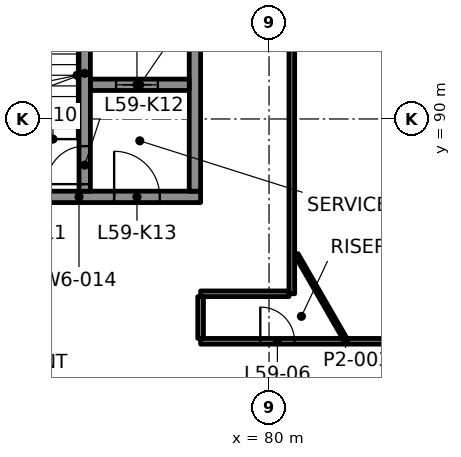
"""IFC4 building model, lengths in metres.
Left out: names, types, materials, properties, quantities, classifications, styles, units other than length and angle.
Written with IfcOpenShell. Run it as: python <this file> out.ifc"""

import sys

from ifc_helpers import new_model, si_unit, direction, frame, frame_2d, origin, place, context, subcontext, project, spatial, rectangle, extrude, element, fill, save


model = new_model("IFC4")
c1 = context("Model", 3, precision=1e-05, world=origin(), true_north=direction((0.0, 1.0)))
c2 = subcontext(c1, "Body", "Model", "MODEL_VIEW")
j1 = project(units=[si_unit("LENGTHUNIT", "METRE"), si_unit("PLANEANGLEUNIT", "RADIAN")], contexts=[c1])
p1 = place(None, origin())
s1 = spatial("IfcSite", under=j1, at=p1, CompositionType="ELEMENT")
p2 = place(p1, origin())
s2 = spatial("IfcBuilding", under=s1, at=p2, CompositionType="ELEMENT")
p3 = place(p2, frame((0.0, 0.0, 252.1)))
s3 = spatial("IfcBuildingStorey", under=s2, at=p3, CompositionType="ELEMENT", Elevation=252.1)
p4 = place(p3, frame((71.8, 87.95, 0.0), z_axis=(0.0, 0.0, 1.0), x_axis=(1.0, 0.0, 0.0)))
e1 = element("IfcWall", 1, at=p4, inside=s3, PredefinedType="SHEAR", context=c2, shape_type="SweptSolid", body=[
    extrude(rectangle(XDim=6.4, YDim=0.3, at=frame_2d((3.2, 0.0))), origin(), (0.0, 0.0, 1.0), 4.3),
])
p5 = place(p4, frame((1.325, 0.0, 0.0)))
e2 = element("IfcOpeningElement", 2, at=p5, cuts=e1, PredefinedType="OPENING", context=c2, shape_type="SweptSolid", body=[
    extrude(rectangle(XDim=1.0, YDim=2.1, at=frame_2d((0.5, 1.05))), frame((0.0, 0.16, 0.0), z_axis=(0.0, -1.0, 0.0), x_axis=(1.0, 0.0, 0.0)), (0.0, 0.0, 1.0), 0.32),
])
p6 = place(p4, frame((4.125, 0.0, 0.0)))
e3 = element("IfcOpeningElement", 3, at=p6, cuts=e1, PredefinedType="OPENING", context=c2, shape_type="SweptSolid", body=[
    extrude(rectangle(XDim=1.2, YDim=2.1, at=frame_2d((0.6, 1.05))), frame((0.0, 0.16, 0.0), z_axis=(0.0, -1.0, 0.0), x_axis=(1.0, 0.0, 0.0)), (0.0, 0.0, 1.0), 0.32),
])
p7 = place(p3, frame((78.05, 88.1, 0.0), z_axis=(0.0, 0.0, 1.0), x_axis=(0.0, 1.0, 0.0)))
e4 = element("IfcWall", 4, at=p7, inside=s3, PredefinedType="SHEAR", context=c2, shape_type="SweptSolid", body=[
    extrude(rectangle(XDim=6.2, YDim=0.3, at=frame_2d((3.1, 0.0))), origin(), (0.0, 0.0, 1.0), 4.3),
])
p8 = place(p3, frame((75.3, 90.9, 0.0), z_axis=(0.0, 0.0, 1.0), x_axis=(1.0, 0.0, 0.0)))
e5 = element("IfcWall", 5, at=p8, inside=s3, PredefinedType="SHEAR", context=c2, shape_type="SweptSolid", body=[
    extrude(rectangle(XDim=2.6, YDim=0.3, at=frame_2d((1.3, 0.0))), origin(), (0.0, 0.0, 1.0), 4.3),
])
p9 = place(p8, frame((0.675, 0.0, 0.0)))
e6 = element("IfcOpeningElement", 6, at=p9, cuts=e5, PredefinedType="OPENING", context=c2, shape_type="SweptSolid", body=[
    extrude(rectangle(XDim=1.1, YDim=2.1, at=frame_2d((0.55, 1.05))), frame((0.0, 0.16, 0.0), z_axis=(0.0, -1.0, 0.0), x_axis=(1.0, 0.0, 0.0)), (0.0, 0.0, 1.0), 0.32),
])
p10 = place(p3, frame((75.15, 88.1, 0.0), z_axis=(0.0, 0.0, 1.0), x_axis=(0.0, 1.0, 0.0)))
e7 = element("IfcWall", 7, at=p10, inside=s3, PredefinedType="SHEAR", context=c2, shape_type="SweptSolid", body=[
    extrude(rectangle(XDim=6.2, YDim=0.3, at=frame_2d((3.1, 0.0))), origin(), (0.0, 0.0, 1.0), 4.3),
])
p11 = place(p10, frame((0.185, 0.0, 0.0)))
e8 = element("IfcOpeningElement", 8, at=p11, cuts=e7, PredefinedType="OPENING", context=c2, shape_type="SweptSolid", body=[
    extrude(rectangle(XDim=1.0, YDim=2.1, at=frame_2d((0.5, 1.05))), frame((0.0, 0.16, 0.0), z_axis=(0.0, -1.0, 0.0), x_axis=(1.0, 0.0, 0.0)), (0.0, 0.0, 1.0), 0.32),
])
p12 = place(p3, frame((78.2, 84.15, 0.0), z_axis=(0.0, 0.0, 1.0), x_axis=(1.0, 0.0, 0.0)))
e9 = element("IfcWall", 9, at=p12, inside=s3, PredefinedType="PARTITIONING", context=c2, shape_type="SweptSolid", body=[
    extrude(rectangle(XDim=7.625, YDim=0.15, at=frame_2d((3.812, 0.0))), origin(), (0.0, 0.0, 1.0), 3.7),
])
p13 = place(p12, frame((1.571, 0.0, 0.0)))
e10 = element("IfcOpeningElement", 10, at=p13, cuts=e9, PredefinedType="OPENING", context=c2, shape_type="SweptSolid", body=[
    extrude(rectangle(XDim=0.9, YDim=2.1, at=frame_2d((0.45, 1.05))), frame((0.0, 0.085, 0.0), z_axis=(0.0, -1.0, 0.0), x_axis=(1.0, 0.0, 0.0)), (0.0, 0.0, 1.0), 0.17),
])
p14 = place(p12, frame((5.6, 0.0, 0.0)))
e11 = element("IfcOpeningElement", 11, at=p14, cuts=e9, PredefinedType="OPENING", context=c2, shape_type="SweptSolid", body=[
    extrude(rectangle(XDim=1.2, YDim=2.1, at=frame_2d((0.6, 1.05))), frame((0.0, 0.085, 0.0), z_axis=(0.0, -1.0, 0.0), x_axis=(1.0, 0.0, 0.0)), (0.0, 0.0, 1.0), 0.17),
])
p15 = place(p3, frame((78.2, 85.4, 0.0), z_axis=(0.0, 0.0, 1.0), x_axis=(1.0, 0.0, 0.0)))
e12 = element("IfcWall", 12, at=p15, inside=s3, PredefinedType="PARTITIONING", context=c2, shape_type="SweptSolid", body=[
    extrude(rectangle(XDim=2.325, YDim=0.15, at=frame_2d((1.163, 0.0))), origin(), (0.0, 0.0, 1.0), 3.7),
])
p16 = place(p3, frame((80.6, 85.4, 0.0), z_axis=(0.0, 0.0, 1.0), x_axis=(0.0, 1.0, 0.0)))
e13 = element("IfcWall", 13, at=p16, inside=s3, PredefinedType="PARTITIONING", context=c2, shape_type="SweptSolid", body=[
    extrude(rectangle(XDim=11.6, YDim=0.15, at=frame_2d((5.8, 0.0))), origin(), (0.0, 0.0, 1.0), 3.7),
])
p17 = place(p3, frame((78.2, 84.225, 0.0), z_axis=(0.0, 0.0, 1.0), x_axis=(0.0, 1.0, 0.0)))
e14 = element("IfcWall", 14, at=p17, inside=s3, PredefinedType="PARTITIONING", context=c2, shape_type="SweptSolid", body=[
    extrude(rectangle(XDim=1.1, YDim=0.15, at=frame_2d((0.55, 0.0))), origin(), (0.0, 0.0, 1.0), 3.7),
])
p18 = place(p3, frame((81.98, 84.251, 0.0), z_axis=(0.0, 0.0, 1.0), x_axis=(-0.500016035621, 0.866016145416, 0.0)))
e15 = element("IfcWall", 15, at=p18, inside=s3, PredefinedType="PARTITIONING", context=c2, shape_type="SweptSolid", body=[
    extrude(rectangle(XDim=2.52, YDim=0.1, at=frame_2d((1.26, 0.0))), origin(), (0.0, 0.0, 1.0), 3.7),
])
p19 = place(p13, origin())
e16 = element("IfcDoor", 16, at=p19, inside=s3, OperationType="SINGLE_SWING_RIGHT", PredefinedType="DOOR", context=c2, shape_type="SweptSolid", body=[
    extrude(rectangle(XDim=0.9, YDim=2.1, at=frame_2d((0.45, 1.05))), frame((0.0, 0.025, 0.0), z_axis=(0.0, -1.0, 0.0), x_axis=(1.0, 0.0, 0.0)), (0.0, 0.0, 1.0), 0.05),
])
fill(e10, e16)
p20 = place(p9, origin())
e17 = element("IfcDoor", 17, at=p20, inside=s3, OperationType="DOUBLE_DOOR_SLIDING", PredefinedType="DOOR", context=c2, shape_type="SweptSolid", body=[
    extrude(rectangle(XDim=1.1, YDim=2.1, at=frame_2d((0.55, 1.05))), frame((0.0, 0.025, 0.0), z_axis=(0.0, -1.0, 0.0), x_axis=(1.0, 0.0, 0.0)), (0.0, 0.0, 1.0), 0.05),
])
fill(e6, e17)
p21 = place(p11, origin())
e18 = element("IfcDoor", 18, at=p21, inside=s3, OperationType="SINGLE_SWING_LEFT", PredefinedType="DOOR", context=c2, shape_type="SweptSolid", body=[
    extrude(rectangle(XDim=1.0, YDim=2.1, at=frame_2d((0.5, 1.05))), frame((0.0, 0.025, 0.0), z_axis=(0.0, -1.0, 0.0), x_axis=(1.0, 0.0, 0.0)), (0.0, 0.0, 1.0), 0.05),
])
fill(e8, e18)
p22 = place(p6, origin())
e19 = element("IfcDoor", 19, at=p22, inside=s3, OperationType="SINGLE_SWING_RIGHT", PredefinedType="DOOR", context=c2, shape_type="SweptSolid", body=[
    extrude(rectangle(XDim=1.2, YDim=2.1, at=frame_2d((0.6, 1.05))), frame((0.0, 0.025, 0.0), z_axis=(0.0, -1.0, 0.0), x_axis=(1.0, 0.0, 0.0)), (0.0, 0.0, 1.0), 0.05),
])
fill(e3, e19)
save(model, sys.argv[1])
